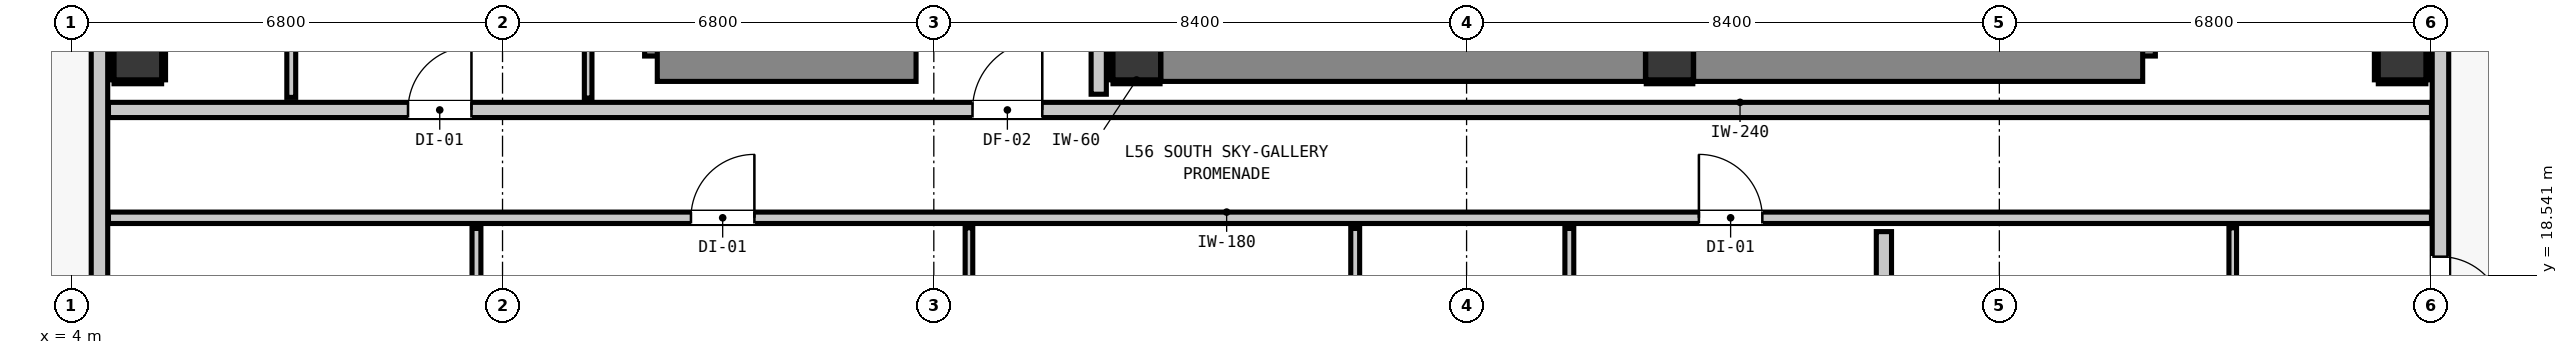
"""IFC4 building model, lengths in metres.
Left out: names, types, materials, properties, quantities, classifications, styles, units other than length and angle.
Written with IfcOpenShell. Run it as: python <this file> out.ifc"""

import sys

from ifc_helpers import new_model, si_unit, direction, frame, frame_2d, origin, origin_2d, place, context, subcontext, project, spatial, rectangle, extrude, element, fill, save


model = new_model("IFC4")
c1 = context("Model", 3, precision=1e-05, world=origin(), true_north=direction((0.0, 1.0)))
c2 = subcontext(c1, "Body", "Model", "MODEL_VIEW")
j1 = project(units=[si_unit("LENGTHUNIT", "METRE"), si_unit("PLANEANGLEUNIT", "RADIAN")], contexts=[c1])
p1 = place(None, origin())
s1 = spatial("IfcSite", under=j1, at=p1, CompositionType="ELEMENT")
p2 = place(p1, origin())
s2 = spatial("IfcBuilding", under=s1, at=p2, CompositionType="ELEMENT")
p3 = place(p2, frame((0.0, 0.0, 193.48)))
s3 = spatial("IfcBuildingStorey", under=s2, at=p3, CompositionType="ELEMENT", Elevation=193.48)
for number, where, z_axis, x_axis in (
    (1, (20.8, 22.0, 0.0), (0.0, 0.0, 1.0), (1.0, 0.0, 0.0)),
    (2, (29.2, 22.0, 0.0), (0.0, 0.0, 1.0), (1.0, 0.0, 0.0)),
):
    element("IfcColumn", number, at=place(p3, frame(where, z_axis=z_axis, x_axis=x_axis)), inside=s3, PredefinedType="COLUMN", context=c2, shape_type="SweptSolid", body=[
        extrude(rectangle(XDim=0.75, YDim=0.75, at=origin_2d()), origin(), (0.0, 0.0, 1.0), 3.32),
    ])
p4 = place(p3, frame((13.44, 22.0, 0.0), z_axis=(0.0, 0.0, 1.0), x_axis=(0.0, 1.0, 0.0)))
e3 = element("IfcWall", 3, at=p4, inside=s3, PredefinedType="SHEAR", context=c2, shape_type="SweptSolid", body=[
    extrude(rectangle(XDim=8.32, YDim=0.8, at=frame_2d((4.16, 0.0))), origin(), (0.0, 0.0, 1.0), 3.32),
])
p5 = place(p3, frame((13.24, 22.0, 0.0), z_axis=(0.0, 0.0, 1.0), x_axis=(1.0, 0.0, 0.0)))
e4 = element("IfcWall", 4, at=p5, inside=s3, PredefinedType="SHEAR", context=c2, shape_type="SweptSolid", body=[
    extrude(rectangle(XDim=4.08, YDim=0.8, at=frame_2d((2.04, 0.0))), origin(), (0.0, 0.0, 1.0), 3.32),
])
p6 = place(p3, frame((36.46, 22.0, 0.0), z_axis=(0.0, 0.0, 1.0), x_axis=(0.0, 1.0, 0.0)))
e5 = element("IfcWall", 5, at=p6, inside=s3, PredefinedType="SHEAR", context=c2, shape_type="SweptSolid", body=[
    extrude(rectangle(XDim=8.32, YDim=0.8, at=frame_2d((4.16, 0.0))), origin(), (0.0, 0.0, 1.0), 3.32),
])
p7 = place(p3, frame((29.58, 22.0, 0.0), z_axis=(0.0, 0.0, 1.0), x_axis=(1.0, 0.0, 0.0)))
e6 = element("IfcWall", 6, at=p7, inside=s3, PredefinedType="SHEAR", context=c2, shape_type="SweptSolid", body=[
    extrude(rectangle(XDim=7.08, YDim=0.8, at=frame_2d((3.54, 0.0))), origin(), (0.0, 0.0, 1.0), 3.32),
])
p8 = place(p3, frame((21.18, 22.0, 0.0), z_axis=(0.0, 0.0, 1.0), x_axis=(1.0, 0.0, 0.0)))
e7 = element("IfcWall", 7, at=p8, inside=s3, PredefinedType="SHEAR", context=c2, shape_type="SweptSolid", body=[
    extrude(rectangle(XDim=7.64, YDim=0.8, at=frame_2d((3.82, 0.0))), origin(), (0.0, 0.0, 1.0), 3.32),
])
for number, where, z_axis, x_axis in (
    (8, (5.05, 22.0, 0.0), (0.0, 0.0, 1.0), (1.0, 0.0, 0.0)),
    (9, (40.75, 22.0, 0.0), (0.0, 0.0, 1.0), (1.0, 0.0, 0.0)),
):
    element("IfcColumn", number, at=place(p3, frame(where, z_axis=z_axis, x_axis=x_axis)), inside=s3, PredefinedType="COLUMN", context=c2, shape_type="SweptSolid", body=[
        extrude(rectangle(XDim=0.75, YDim=0.75, at=origin_2d()), origin(), (0.0, 0.0, 1.0), 3.32),
    ])
p9 = place(p3, frame((4.445, 12.345, 0.0), z_axis=(0.0, 0.0, 1.0), x_axis=(0.0, 1.0, 0.0)))
e10 = element("IfcWall", 10, at=p9, inside=s3, PredefinedType="STANDARD", context=c2, shape_type="SweptSolid", body=[
    extrude(rectangle(XDim=30.31, YDim=0.26, at=frame_2d((15.155, 0.0))), origin(), (0.0, 0.0, 1.0), 3.1),
])
p10 = place(p9, frame((0.91, 0.0, 0.0)))
e11 = element("IfcOpeningElement", 11, at=p10, cuts=e10, PredefinedType="OPENING", context=c2, shape_type="SweptSolid", body=[
    extrude(rectangle(XDim=1.0, YDim=2.15, at=frame_2d((0.5, 1.075))), frame((0.0, 0.14, 0.0), z_axis=(0.0, -1.0, 0.0), x_axis=(1.0, 0.0, 0.0)), (0.0, 0.0, 1.0), 0.28),
])
p11 = place(p9, frame((2.322, 0.0, 0.85)))
e12 = element("IfcOpeningElement", 12, at=p11, cuts=e10, PredefinedType="OPENING", context=c2, shape_type="SweptSolid", body=[
    extrude(rectangle(XDim=0.58, YDim=1.5, at=frame_2d((0.29, 0.75))), frame((0.0, 0.14, 0.0), z_axis=(0.0, -1.0, 0.0), x_axis=(1.0, 0.0, 0.0)), (0.0, 0.0, 1.0), 0.28),
])
p12 = place(p3, frame((41.355, 42.655, 0.0), z_axis=(0.0, 0.0, 1.0), x_axis=(0.0, -1.0, 0.0)))
e13 = element("IfcWall", 13, at=p12, inside=s3, PredefinedType="STANDARD", context=c2, shape_type="SweptSolid", body=[
    extrude(rectangle(XDim=30.31, YDim=0.26, at=frame_2d((15.155, 0.0))), origin(), (0.0, 0.0, 1.0), 3.1),
])
p13 = place(p12, frame((23.818, 0.0, 0.0)))
e14 = element("IfcOpeningElement", 14, at=p13, cuts=e13, PredefinedType="OPENING", context=c2, shape_type="SweptSolid", body=[
    extrude(rectangle(XDim=1.0, YDim=2.15, at=frame_2d((0.5, 1.075))), frame((0.0, 0.14, 0.0), z_axis=(0.0, -1.0, 0.0), x_axis=(1.0, 0.0, 0.0)), (0.0, 0.0, 1.0), 0.28),
])
p14 = place(p12, frame((25.332, 0.0, 0.85)))
e15 = element("IfcOpeningElement", 15, at=p14, cuts=e13, PredefinedType="OPENING", context=c2, shape_type="SweptSolid", body=[
    extrude(rectangle(XDim=1.35, YDim=1.85, at=frame_2d((0.675, 0.925))), frame((0.0, 0.14, 0.0), z_axis=(0.0, -1.0, 0.0), x_axis=(1.0, 0.0, 0.0)), (0.0, 0.0, 1.0), 0.28),
])
p15 = place(p12, frame((28.033, 0.0, 0.85)))
e16 = element("IfcOpeningElement", 16, at=p15, cuts=e13, PredefinedType="OPENING", context=c2, shape_type="SweptSolid", body=[
    extrude(rectangle(XDim=1.35, YDim=1.85, at=frame_2d((0.675, 0.925))), frame((0.0, 0.14, 0.0), z_axis=(0.0, -1.0, 0.0), x_axis=(1.0, 0.0, 0.0)), (0.0, 0.0, 1.0), 0.28),
])
p16 = place(p3, frame((4.587, 21.15, 0.0), z_axis=(0.0, 0.0, 1.0), x_axis=(1.0, 0.0, 0.0)))
e17 = element("IfcWall", 17, at=p16, inside=s3, PredefinedType="PARTITIONING", context=c2, shape_type="SweptSolid", body=[
    extrude(rectangle(XDim=36.626, YDim=0.24, at=frame_2d((18.313, 0.0))), origin(), (0.0, 0.0, 1.0), 3.1),
])
p17 = place(p16, frame((13.623, 0.0, 0.0)))
e18 = element("IfcOpeningElement", 18, at=p17, cuts=e17, PredefinedType="OPENING", context=c2, shape_type="SweptSolid", body=[
    extrude(rectangle(XDim=1.1, YDim=2.15, at=frame_2d((0.55, 1.075))), frame((0.0, 0.13, 0.0), z_axis=(0.0, -1.0, 0.0), x_axis=(1.0, 0.0, 0.0)), (0.0, 0.0, 1.0), 0.26),
])
p18 = place(p16, frame((4.723, 0.0, 0.0)))
e19 = element("IfcOpeningElement", 19, at=p18, cuts=e17, PredefinedType="OPENING", context=c2, shape_type="SweptSolid", body=[
    extrude(rectangle(XDim=1.0, YDim=2.15, at=frame_2d((0.5, 1.075))), frame((0.0, 0.13, 0.0), z_axis=(0.0, -1.0, 0.0), x_axis=(1.0, 0.0, 0.0)), (0.0, 0.0, 1.0), 0.26),
])
p19 = place(p3, frame((4.587, 19.45, 0.0), z_axis=(0.0, 0.0, 1.0), x_axis=(1.0, 0.0, 0.0)))
e20 = element("IfcWall", 20, at=p19, inside=s3, PredefinedType="PARTITIONING", context=c2, shape_type="SweptSolid", body=[
    extrude(rectangle(XDim=36.626, YDim=0.18, at=frame_2d((18.313, 0.0))), origin(), (0.0, 0.0, 1.0), 3.1),
])
p20 = place(p19, frame((9.184, 0.0, 0.0)))
e21 = element("IfcOpeningElement", 21, at=p20, cuts=e20, PredefinedType="OPENING", context=c2, shape_type="SweptSolid", body=[
    extrude(rectangle(XDim=1.0, YDim=2.15, at=frame_2d((0.5, 1.075))), frame((0.0, 0.1, 0.0), z_axis=(0.0, -1.0, 0.0), x_axis=(1.0, 0.0, 0.0)), (0.0, 0.0, 1.0), 0.2),
])
p21 = place(p19, frame((25.076, 0.0, 0.0)))
e22 = element("IfcOpeningElement", 22, at=p21, cuts=e20, PredefinedType="OPENING", context=c2, shape_type="SweptSolid", body=[
    extrude(rectangle(XDim=1.0, YDim=2.15, at=frame_2d((0.5, 1.075))), frame((0.0, 0.1, 0.0), z_axis=(0.0, -1.0, 0.0), x_axis=(1.0, 0.0, 0.0)), (0.0, 0.0, 1.0), 0.2),
])
p22 = place(p3, frame((20.2, 21.398, 0.0), z_axis=(0.0, 0.0, 1.0), x_axis=(0.0, 1.0, 0.0)))
e23 = element("IfcWall", 23, at=p22, inside=s3, PredefinedType="PARTITIONING", context=c2, shape_type="SweptSolid", body=[
    extrude(rectangle(XDim=6.754, YDim=0.24, at=frame_2d((3.377, 0.0))), origin(), (0.0, 0.0, 1.0), 3.1),
])
p23 = place(p3, frame((32.58, 15.644, 0.0), z_axis=(0.0, 0.0, 1.0), x_axis=(0.0, 1.0, 0.0)))
e24 = element("IfcWall", 24, at=p23, inside=s3, PredefinedType="PARTITIONING", context=c2, shape_type="SweptSolid", body=[
    extrude(rectangle(XDim=3.588, YDim=0.24, at=frame_2d((1.794, 0.0))), origin(), (0.0, 0.0, 1.0), 3.1),
])
p24 = place(p23, frame((1.398, 0.0, 0.0)))
e25 = element("IfcOpeningElement", 25, at=p24, cuts=e24, PredefinedType="OPENING", context=c2, shape_type="SweptSolid", body=[
    extrude(rectangle(XDim=0.9, YDim=2.1, at=frame_2d((0.45, 1.05))), frame((0.0, 0.13, 0.0), z_axis=(0.0, -1.0, 0.0), x_axis=(1.0, 0.0, 0.0)), (0.0, 0.0, 1.0), 0.26),
])
p25 = place(p3, frame((7.469, 21.348, 0.0), z_axis=(0.0, 0.0, 1.0), x_axis=(0.0, 1.0, 0.0)))
e26 = element("IfcWall", 26, at=p25, inside=s3, PredefinedType="PARTITIONING", context=c2, shape_type="SweptSolid", body=[
    extrude(rectangle(XDim=4.804, YDim=0.14, at=frame_2d((2.402, 0.0))), origin(), (0.0, 0.0, 1.0), 3.1),
])
p26 = place(p25, frame((1.94, 0.0, 0.0)))
e27 = element("IfcOpeningElement", 27, at=p26, cuts=e26, PredefinedType="OPENING", context=c2, shape_type="SweptSolid", body=[
    extrude(rectangle(XDim=0.9, YDim=2.1, at=frame_2d((0.45, 1.05))), frame((0.0, 0.08, 0.0), z_axis=(0.0, -1.0, 0.0), x_axis=(1.0, 0.0, 0.0)), (0.0, 0.0, 1.0), 0.16),
])
p27 = place(p3, frame((10.389, 15.707, 0.0), z_axis=(0.0, 0.0, 1.0), x_axis=(0.0, 1.0, 0.0)))
e28 = element("IfcWall", 28, at=p27, inside=s3, PredefinedType="PARTITIONING", context=c2, shape_type="SweptSolid", body=[
    extrude(rectangle(XDim=3.575, YDim=0.14, at=frame_2d((1.788, 0.0))), origin(), (0.0, 0.0, 1.0), 3.1),
])
p28 = place(p27, frame((1.355, 0.0, 0.0)))
e29 = element("IfcOpeningElement", 29, at=p28, cuts=e28, PredefinedType="OPENING", context=c2, shape_type="SweptSolid", body=[
    extrude(rectangle(XDim=0.86, YDim=2.02, at=frame_2d((0.43, 1.01))), frame((0.0, 0.08, 0.0), z_axis=(0.0, -1.0, 0.0), x_axis=(1.0, 0.0, 0.0)), (0.0, 0.0, 1.0), 0.16),
])
p29 = place(p3, frame((24.244, 15.707, 0.0), z_axis=(0.0, 0.0, 1.0), x_axis=(0.0, 1.0, 0.0)))
e30 = element("IfcWall", 30, at=p29, inside=s3, PredefinedType="PARTITIONING", context=c2, shape_type="SweptSolid", body=[
    extrude(rectangle(XDim=3.575, YDim=0.14, at=frame_2d((1.788, 0.0))), origin(), (0.0, 0.0, 1.0), 3.1),
])
p30 = place(p3, frame((27.62, 15.707, 0.0), z_axis=(0.0, 0.0, 1.0), x_axis=(0.0, 1.0, 0.0)))
e31 = element("IfcWall", 31, at=p30, inside=s3, PredefinedType="PARTITIONING", context=c2, shape_type="SweptSolid", body=[
    extrude(rectangle(XDim=3.575, YDim=0.14, at=frame_2d((1.788, 0.0))), origin(), (0.0, 0.0, 1.0), 3.1),
])
p31 = place(p30, frame((1.355, 0.0, 0.0)))
e32 = element("IfcOpeningElement", 32, at=p31, cuts=e31, PredefinedType="OPENING", context=c2, shape_type="SweptSolid", body=[
    extrude(rectangle(XDim=0.86, YDim=2.02, at=frame_2d((0.43, 1.01))), frame((0.0, 0.08, 0.0), z_axis=(0.0, -1.0, 0.0), x_axis=(1.0, 0.0, 0.0)), (0.0, 0.0, 1.0), 0.16),
])
p32 = place(p3, frame((12.15, 21.338, 0.0), z_axis=(0.0, 0.0, 1.0), x_axis=(0.0, 1.0, 0.0)))
e33 = element("IfcWall", 33, at=p32, inside=s3, PredefinedType="PARTITIONING", context=c2, shape_type="SweptSolid", body=[
    extrude(rectangle(XDim=10.154, YDim=0.12, at=frame_2d((5.077, 0.0))), origin(), (0.0, 0.0, 1.0), 3.1),
])
p33 = place(p3, frame((18.154, 15.697, 0.0), z_axis=(0.0, 0.0, 1.0), x_axis=(0.0, 1.0, 0.0)))
e34 = element("IfcWall", 34, at=p33, inside=s3, PredefinedType="PARTITIONING", context=c2, shape_type="SweptSolid", body=[
    extrude(rectangle(XDim=3.595, YDim=0.12, at=frame_2d((1.797, 0.0))), origin(), (0.0, 0.0, 1.0), 3.1),
])
p34 = place(p33, frame((1.345, 0.0, 0.0)))
e35 = element("IfcOpeningElement", 35, at=p34, cuts=e34, PredefinedType="OPENING", context=c2, shape_type="SweptSolid", body=[
    extrude(rectangle(XDim=0.9, YDim=2.1, at=frame_2d((0.45, 1.05))), frame((0.0, 0.07, 0.0), z_axis=(0.0, -1.0, 0.0), x_axis=(1.0, 0.0, 0.0)), (0.0, 0.0, 1.0), 0.14),
])
p35 = place(p3, frame((38.08, 15.697, 0.0), z_axis=(0.0, 0.0, 1.0), x_axis=(0.0, 1.0, 0.0)))
e36 = element("IfcWall", 36, at=p35, inside=s3, PredefinedType="PARTITIONING", context=c2, shape_type="SweptSolid", body=[
    extrude(rectangle(XDim=3.595, YDim=0.12, at=frame_2d((1.797, 0.0))), origin(), (0.0, 0.0, 1.0), 3.1),
])
p36 = place(p35, frame((1.358, 0.0, 0.0)))
e37 = element("IfcOpeningElement", 37, at=p36, cuts=e36, PredefinedType="OPENING", context=c2, shape_type="SweptSolid", body=[
    extrude(rectangle(XDim=0.9, YDim=2.1, at=frame_2d((0.45, 1.05))), frame((0.0, 0.07, 0.0), z_axis=(0.0, -1.0, 0.0), x_axis=(1.0, 0.0, 0.0)), (0.0, 0.0, 1.0), 0.14),
])
p37 = place(p3, frame((20.425, 21.593, 0.0), z_axis=(0.0, 0.0, 1.0), x_axis=(1.0, 0.0, 0.0)))
e38 = element("IfcWall", 38, at=p37, inside=s3, PredefinedType="PARTITIONING", context=c2, shape_type="SweptSolid", body=[
    extrude(rectangle(XDim=0.742, YDim=0.06, at=frame_2d((0.371, 0.0))), origin(), (0.0, 0.0, 1.0), 1.45),
])
p38 = place(p3, frame((20.393, 21.625, 0.0), z_axis=(0.0, 0.0, 1.0), x_axis=(0.0, 1.0, 0.0)))
e39 = element("IfcWall", 39, at=p38, inside=s3, PredefinedType="PARTITIONING", context=c2, shape_type="SweptSolid", body=[
    extrude(rectangle(XDim=0.75, YDim=0.06, at=frame_2d((0.375, 0.0))), origin(), (0.0, 0.0, 1.0), 1.45),
])
p39 = place(p3, frame((28.833, 21.593, 0.0), z_axis=(0.0, 0.0, 1.0), x_axis=(1.0, 0.0, 0.0)))
e40 = element("IfcWall", 40, at=p39, inside=s3, PredefinedType="PARTITIONING", context=c2, shape_type="SweptSolid", body=[
    extrude(rectangle(XDim=0.734, YDim=0.06, at=frame_2d((0.367, 0.0))), origin(), (0.0, 0.0, 1.0), 1.45),
])
for number, where, z_axis, x_axis in (
    (41, (4.675, 21.593, 0.0), (0.0, 0.0, 1.0), (1.0, 0.0, 0.0)),
    (42, (4.643, 21.625, 0.0), (0.0, 0.0, 1.0), (0.0, 1.0, 0.0)),
    (43, (5.457, 21.625, 0.0), (0.0, 0.0, 1.0), (0.0, 1.0, 0.0)),
    (44, (40.375, 21.593, 0.0), (0.0, 0.0, 1.0), (1.0, 0.0, 0.0)),
    (45, (40.343, 21.625, 0.0), (0.0, 0.0, 1.0), (0.0, 1.0, 0.0)),
    (46, (41.157, 21.625, 0.0), (0.0, 0.0, 1.0), (0.0, 1.0, 0.0)),
):
    element("IfcWall", number, at=place(p3, frame(where, z_axis=z_axis, x_axis=x_axis)), inside=s3, PredefinedType="PARTITIONING", context=c2, shape_type="SweptSolid", body=[
        extrude(rectangle(XDim=0.75, YDim=0.06, at=frame_2d((0.375, 0.0))), origin(), (0.0, 0.0, 1.0), 1.45),
    ])
p40 = place(p13, origin())
e47 = element("IfcDoor", 47, at=p40, inside=s3, OperationType="SINGLE_SWING_RIGHT", PredefinedType="DOOR", context=c2, shape_type="SweptSolid", body=[
    extrude(rectangle(XDim=1.0, YDim=2.15, at=frame_2d((0.5, 1.075))), frame((0.0, 0.025, 0.0), z_axis=(0.0, -1.0, 0.0), x_axis=(1.0, 0.0, 0.0)), (0.0, 0.0, 1.0), 0.05),
])
fill(e14, e47)
p41 = place(p17, origin())
e48 = element("IfcDoor", 48, at=p41, inside=s3, OperationType="SINGLE_SWING_RIGHT", PredefinedType="DOOR", context=c2, shape_type="SweptSolid", body=[
    extrude(rectangle(XDim=1.1, YDim=2.15, at=frame_2d((0.55, 1.075))), frame((0.0, 0.025, 0.0), z_axis=(0.0, -1.0, 0.0), x_axis=(1.0, 0.0, 0.0)), (0.0, 0.0, 1.0), 0.05),
])
fill(e18, e48)
p42 = place(p20, origin())
e49 = element("IfcDoor", 49, at=p42, inside=s3, OperationType="SINGLE_SWING_RIGHT", PredefinedType="DOOR", context=c2, shape_type="SweptSolid", body=[
    extrude(rectangle(XDim=1.0, YDim=2.15, at=frame_2d((0.5, 1.075))), frame((0.0, 0.025, 0.0), z_axis=(0.0, -1.0, 0.0), x_axis=(1.0, 0.0, 0.0)), (0.0, 0.0, 1.0), 0.05),
])
fill(e21, e49)
p43 = place(p21, origin())
e50 = element("IfcDoor", 50, at=p43, inside=s3, OperationType="SINGLE_SWING_LEFT", PredefinedType="DOOR", context=c2, shape_type="SweptSolid", body=[
    extrude(rectangle(XDim=1.0, YDim=2.15, at=frame_2d((0.5, 1.075))), frame((0.0, 0.025, 0.0), z_axis=(0.0, -1.0, 0.0), x_axis=(1.0, 0.0, 0.0)), (0.0, 0.0, 1.0), 0.05),
])
fill(e22, e50)
p44 = place(p18, origin())
e51 = element("IfcDoor", 51, at=p44, inside=s3, OperationType="SINGLE_SWING_RIGHT", PredefinedType="DOOR", context=c2, shape_type="SweptSolid", body=[
    extrude(rectangle(XDim=1.0, YDim=2.15, at=frame_2d((0.5, 1.075))), frame((0.0, 0.025, 0.0), z_axis=(0.0, -1.0, 0.0), x_axis=(1.0, 0.0, 0.0)), (0.0, 0.0, 1.0), 0.05),
])
fill(e19, e51)
save(model, sys.argv[1])
